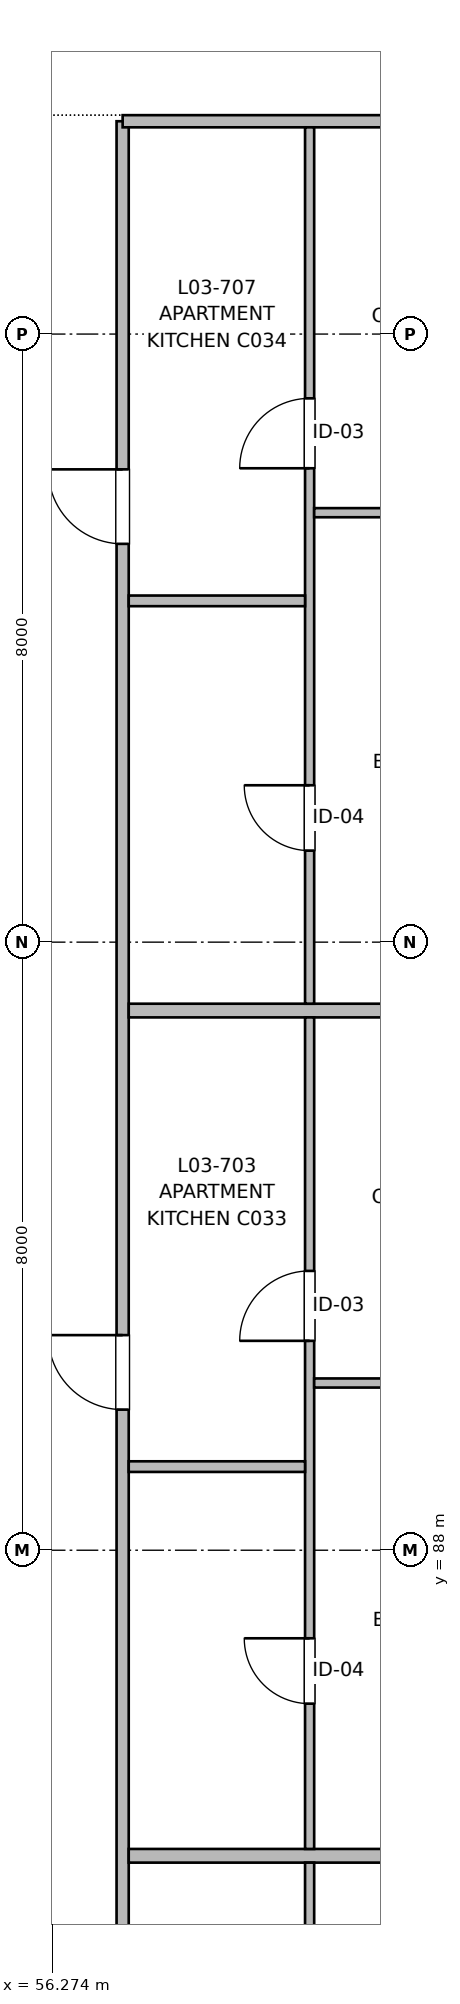
"""IFC4 building model, lengths in metres.
Left out: names, types, materials, properties, quantities, classifications, styles, units other than length and angle.
Written with IfcOpenShell. Run it as: python <this file> out.ifc"""

import sys

from ifc_helpers import new_model, si_unit, direction, frame, frame_2d, origin, place, context, subcontext, project, spatial, rectangle, extrude, element, fill, save


model = new_model("IFC4")
c1 = context("Model", 3, precision=1e-05, world=origin(), true_north=direction((0.0, 1.0)))
c2 = subcontext(c1, "Body", "Model", "MODEL_VIEW")
j1 = project(units=[si_unit("LENGTHUNIT", "METRE"), si_unit("PLANEANGLEUNIT", "RADIAN")], contexts=[c1])
p1 = place(None, origin())
s1 = spatial("IfcSite", under=j1, at=p1, CompositionType="ELEMENT")
p2 = place(p1, origin())
s2 = spatial("IfcBuilding", under=s1, at=p2, CompositionType="ELEMENT")
p3 = place(p2, frame((0.0, 0.0, 10.56)))
s3 = spatial("IfcBuildingStorey", under=s2, at=p3, CompositionType="ELEMENT", Elevation=10.56)
p4 = place(p3, frame((57.2, 56.18, 0.0), z_axis=(0.0, 0.0, 1.0), x_axis=(0.0, 1.0, 0.0)))
e1 = element("IfcWall", 1, at=p4, inside=s3, PredefinedType="PARTITIONING", context=c2, shape_type="SweptSolid", body=[
    extrude(rectangle(XDim=50.62, YDim=0.16, at=frame_2d((25.31, 0.0))), origin(), (0.0, 0.0, 1.0), 2.935),
])
p5 = place(p4, frame((6.99, 0.0, 0.0)))
e2 = element("IfcOpeningElement", 2, at=p5, cuts=e1, PredefinedType="OPENING", context=c2, shape_type="SweptSolid", body=[
    extrude(rectangle(XDim=0.98, YDim=2.15, at=frame_2d((0.49, 1.075))), frame((0.0, 0.09, 0.0), z_axis=(0.0, -1.0, 0.0), x_axis=(1.0, 0.0, 0.0)), (0.0, 0.0, 1.0), 0.18),
])
p6 = place(p4, frame((20.92, 0.0, 0.0)))
e3 = element("IfcOpeningElement", 3, at=p6, cuts=e1, PredefinedType="OPENING", context=c2, shape_type="SweptSolid", body=[
    extrude(rectangle(XDim=1.02, YDim=2.15, at=frame_2d((0.51, 1.075))), frame((0.0, 0.09, 0.0), z_axis=(0.0, -1.0, 0.0), x_axis=(1.0, 0.0, 0.0)), (0.0, 0.0, 1.0), 0.18),
])
p7 = place(p4, frame((33.67, 0.0, 0.0)))
e4 = element("IfcOpeningElement", 4, at=p7, cuts=e1, PredefinedType="OPENING", context=c2, shape_type="SweptSolid", body=[
    extrude(rectangle(XDim=0.98, YDim=2.15, at=frame_2d((0.49, 1.075))), frame((0.0, 0.09, 0.0), z_axis=(0.0, -1.0, 0.0), x_axis=(1.0, 0.0, 0.0)), (0.0, 0.0, 1.0), 0.18),
])
p8 = place(p4, frame((45.06, 0.0, 0.0)))
e5 = element("IfcOpeningElement", 5, at=p8, cuts=e1, PredefinedType="OPENING", context=c2, shape_type="SweptSolid", body=[
    extrude(rectangle(XDim=0.98, YDim=2.15, at=frame_2d((0.49, 1.075))), frame((0.0, 0.09, 0.0), z_axis=(0.0, -1.0, 0.0), x_axis=(1.0, 0.0, 0.0)), (0.0, 0.0, 1.0), 0.18),
])
p9 = place(p3, frame((57.2, 106.8, 0.0), z_axis=(0.0, 0.0, 1.0), x_axis=(1.0, 0.0, 0.0)))
e6 = element("IfcWall", 6, at=p9, inside=s3, PredefinedType="PARTITIONING", context=c2, shape_type="SweptSolid", body=[
    extrude(rectangle(XDim=24.12, YDim=0.16, at=frame_2d((12.06, 0.0))), origin(), (0.0, 0.0, 1.0), 2.935),
])
p10 = place(p9, frame((19.575, 0.0, 0.0)))
e7 = element("IfcOpeningElement", 7, at=p10, cuts=e6, PredefinedType="OPENING", context=c2, shape_type="SweptSolid", body=[
    extrude(rectangle(XDim=1.05, YDim=2.15, at=frame_2d((0.525, 1.075))), frame((0.0, 0.09, 0.0), z_axis=(0.0, -1.0, 0.0), x_axis=(1.0, 0.0, 0.0)), (0.0, 0.0, 1.0), 0.18),
])
p11 = place(p9, frame((8.995, 0.0, 0.0)))
e8 = element("IfcOpeningElement", 8, at=p11, cuts=e6, PredefinedType="OPENING", context=c2, shape_type="SweptSolid", body=[
    extrude(rectangle(XDim=0.98, YDim=2.15, at=frame_2d((0.49, 1.075))), frame((0.0, 0.09, 0.0), z_axis=(0.0, -1.0, 0.0), x_axis=(1.0, 0.0, 0.0)), (0.0, 0.0, 1.0), 0.18),
])
p12 = place(p3, frame((57.28, 83.98, 0.0), z_axis=(0.0, 0.0, 1.0), x_axis=(1.0, 0.0, 0.0)))
e9 = element("IfcWall", 9, at=p12, inside=s3, PredefinedType="PARTITIONING", context=c2, shape_type="SweptSolid", body=[
    extrude(rectangle(XDim=6.59, YDim=0.18, at=frame_2d((3.295, 0.0))), origin(), (0.0, 0.0, 1.0), 2.935),
])
p13 = place(p3, frame((57.28, 95.1, 0.0), z_axis=(0.0, 0.0, 1.0), x_axis=(1.0, 0.0, 0.0)))
e10 = element("IfcWall", 10, at=p13, inside=s3, PredefinedType="PARTITIONING", context=c2, shape_type="SweptSolid", body=[
    extrude(rectangle(XDim=12.887, YDim=0.18, at=frame_2d((6.444, 0.0))), origin(), (0.0, 0.0, 1.0), 2.935),
])
p14 = place(p3, frame((59.66, 69.92, 0.0), z_axis=(0.0, 0.0, 1.0), x_axis=(0.0, 1.0, 0.0)))
e11 = element("IfcWall", 11, at=p14, inside=s3, PredefinedType="PARTITIONING", context=c2, shape_type="SweptSolid", body=[
    extrude(rectangle(XDim=13.97, YDim=0.12, at=frame_2d((6.985, 0.0))), origin(), (0.0, 0.0, 1.0), 2.935),
])
p15 = place(p14, frame((2.443, 0.0, 0.0)))
e12 = element("IfcOpeningElement", 12, at=p15, cuts=e11, PredefinedType="OPENING", context=c2, shape_type="SweptSolid", body=[
    extrude(rectangle(XDim=0.94, YDim=2.1, at=frame_2d((0.47, 1.05))), frame((0.0, 0.07, 0.0), z_axis=(0.0, -1.0, 0.0), x_axis=(1.0, 0.0, 0.0)), (0.0, 0.0, 1.0), 0.14),
])
p16 = place(p14, frame((8.541, 0.0, 0.0)))
e13 = element("IfcOpeningElement", 13, at=p16, cuts=e11, PredefinedType="OPENING", context=c2, shape_type="SweptSolid", body=[
    extrude(rectangle(XDim=0.92, YDim=2.1, at=frame_2d((0.46, 1.05))), frame((0.0, 0.07, 0.0), z_axis=(0.0, -1.0, 0.0), x_axis=(1.0, 0.0, 0.0)), (0.0, 0.0, 1.0), 0.14),
])
p17 = place(p3, frame((59.66, 84.07, 0.0), z_axis=(0.0, 0.0, 1.0), x_axis=(0.0, 1.0, 0.0)))
e14 = element("IfcWall", 14, at=p17, inside=s3, PredefinedType="PARTITIONING", context=c2, shape_type="SweptSolid", body=[
    extrude(rectangle(XDim=10.94, YDim=0.12, at=frame_2d((5.47, 0.0))), origin(), (0.0, 0.0, 1.0), 2.935),
])
p18 = place(p17, frame((1.911, 0.0, 0.0)))
e15 = element("IfcOpeningElement", 15, at=p18, cuts=e14, PredefinedType="OPENING", context=c2, shape_type="SweptSolid", body=[
    extrude(rectangle(XDim=0.86, YDim=2.1, at=frame_2d((0.43, 1.05))), frame((0.0, 0.07, 0.0), z_axis=(0.0, -1.0, 0.0), x_axis=(1.0, 0.0, 0.0)), (0.0, 0.0, 1.0), 0.14),
])
p19 = place(p17, frame((6.685, 0.0, 0.0)))
e16 = element("IfcOpeningElement", 16, at=p19, cuts=e14, PredefinedType="OPENING", context=c2, shape_type="SweptSolid", body=[
    extrude(rectangle(XDim=0.92, YDim=2.1, at=frame_2d((0.46, 1.05))), frame((0.0, 0.07, 0.0), z_axis=(0.0, -1.0, 0.0), x_axis=(1.0, 0.0, 0.0)), (0.0, 0.0, 1.0), 0.14),
])
p20 = place(p3, frame((57.28, 89.1, 0.0), z_axis=(0.0, 0.0, 1.0), x_axis=(1.0, 0.0, 0.0)))
e17 = element("IfcWall", 17, at=p20, inside=s3, PredefinedType="PARTITIONING", context=c2, shape_type="SweptSolid", body=[
    extrude(rectangle(XDim=2.32, YDim=0.14, at=frame_2d((1.16, 0.0))), origin(), (0.0, 0.0, 1.0), 2.935),
])
p21 = place(p3, frame((59.72, 90.2, 0.0), z_axis=(0.0, 0.0, 1.0), x_axis=(1.0, 0.0, 0.0)))
e18 = element("IfcWall", 18, at=p21, inside=s3, PredefinedType="PARTITIONING", context=c2, shape_type="SweptSolid", body=[
    extrude(rectangle(XDim=5.994, YDim=0.12, at=frame_2d((2.997, 0.0))), origin(), (0.0, 0.0, 1.0), 2.935),
])
p22 = place(p21, frame((1.625, 0.0, 0.0)))
e19 = element("IfcOpeningElement", 19, at=p22, cuts=e18, PredefinedType="OPENING", context=c2, shape_type="SweptSolid", body=[
    extrude(rectangle(XDim=0.9, YDim=2.1, at=frame_2d((0.45, 1.05))), frame((0.0, 0.07, 0.0), z_axis=(0.0, -1.0, 0.0), x_axis=(1.0, 0.0, 0.0)), (0.0, 0.0, 1.0), 0.14),
])
p23 = place(p3, frame((59.66, 95.19, 0.0), z_axis=(0.0, 0.0, 1.0), x_axis=(0.0, 1.0, 0.0)))
e20 = element("IfcWall", 20, at=p23, inside=s3, PredefinedType="PARTITIONING", context=c2, shape_type="SweptSolid", body=[
    extrude(rectangle(XDim=11.53, YDim=0.12, at=frame_2d((5.765, 0.0))), origin(), (0.0, 0.0, 1.0), 2.935),
])
p24 = place(p23, frame((2.014, 0.0, 0.0)))
e21 = element("IfcOpeningElement", 21, at=p24, cuts=e20, PredefinedType="OPENING", context=c2, shape_type="SweptSolid", body=[
    extrude(rectangle(XDim=0.86, YDim=2.1, at=frame_2d((0.43, 1.05))), frame((0.0, 0.07, 0.0), z_axis=(0.0, -1.0, 0.0), x_axis=(1.0, 0.0, 0.0)), (0.0, 0.0, 1.0), 0.14),
])
p25 = place(p23, frame((7.044, 0.0, 0.0)))
e22 = element("IfcOpeningElement", 22, at=p25, cuts=e20, PredefinedType="OPENING", context=c2, shape_type="SweptSolid", body=[
    extrude(rectangle(XDim=0.92, YDim=2.1, at=frame_2d((0.46, 1.05))), frame((0.0, 0.07, 0.0), z_axis=(0.0, -1.0, 0.0), x_axis=(1.0, 0.0, 0.0)), (0.0, 0.0, 1.0), 0.14),
])
p26 = place(p3, frame((57.28, 100.49, 0.0), z_axis=(0.0, 0.0, 1.0), x_axis=(1.0, 0.0, 0.0)))
e23 = element("IfcWall", 23, at=p26, inside=s3, PredefinedType="PARTITIONING", context=c2, shape_type="SweptSolid", body=[
    extrude(rectangle(XDim=2.32, YDim=0.14, at=frame_2d((1.16, 0.0))), origin(), (0.0, 0.0, 1.0), 2.73),
])
p27 = place(p3, frame((59.72, 101.65, 0.0), z_axis=(0.0, 0.0, 1.0), x_axis=(1.0, 0.0, 0.0)))
e24 = element("IfcWall", 24, at=p27, inside=s3, PredefinedType="PARTITIONING", context=c2, shape_type="SweptSolid", body=[
    extrude(rectangle(XDim=4.19, YDim=0.12, at=frame_2d((2.095, 0.0))), origin(), (0.0, 0.0, 1.0), 2.935),
])
p28 = place(p27, frame((1.645, 0.0, 0.0)))
e25 = element("IfcOpeningElement", 25, at=p28, cuts=e24, PredefinedType="OPENING", context=c2, shape_type="SweptSolid", body=[
    extrude(rectangle(XDim=0.9, YDim=2.1, at=frame_2d((0.45, 1.05))), frame((0.0, 0.07, 0.0), z_axis=(0.0, -1.0, 0.0), x_axis=(1.0, 0.0, 0.0)), (0.0, 0.0, 1.0), 0.14),
])
p29 = place(p18, origin())
e26 = element("IfcDoor", 26, at=p29, inside=s3, OperationType="SINGLE_SWING_RIGHT", PredefinedType="DOOR", context=c2, shape_type="SweptSolid", body=[
    extrude(rectangle(XDim=0.86, YDim=2.1, at=frame_2d((0.43, 1.05))), frame((0.0, 0.025, 0.0), z_axis=(0.0, -1.0, 0.0), x_axis=(1.0, 0.0, 0.0)), (0.0, 0.0, 1.0), 0.05),
])
fill(e15, e26)
p30 = place(p19, origin())
e27 = element("IfcDoor", 27, at=p30, inside=s3, OperationType="SINGLE_SWING_LEFT", PredefinedType="DOOR", context=c2, shape_type="SweptSolid", body=[
    extrude(rectangle(XDim=0.92, YDim=2.1, at=frame_2d((0.46, 1.05))), frame((0.0, 0.025, 0.0), z_axis=(0.0, -1.0, 0.0), x_axis=(1.0, 0.0, 0.0)), (0.0, 0.0, 1.0), 0.05),
])
fill(e16, e27)
p31 = place(p7, origin())
e28 = element("IfcDoor", 28, at=p31, inside=s3, OperationType="SINGLE_SWING_RIGHT", PredefinedType="DOOR", context=c2, shape_type="SweptSolid", body=[
    extrude(rectangle(XDim=0.98, YDim=2.15, at=frame_2d((0.49, 1.075))), frame((0.0, 0.025, 0.0), z_axis=(0.0, -1.0, 0.0), x_axis=(1.0, 0.0, 0.0)), (0.0, 0.0, 1.0), 0.05),
])
fill(e4, e28)
p32 = place(p24, origin())
e29 = element("IfcDoor", 29, at=p32, inside=s3, OperationType="SINGLE_SWING_RIGHT", PredefinedType="DOOR", context=c2, shape_type="SweptSolid", body=[
    extrude(rectangle(XDim=0.86, YDim=2.1, at=frame_2d((0.43, 1.05))), frame((0.0, 0.025, 0.0), z_axis=(0.0, -1.0, 0.0), x_axis=(1.0, 0.0, 0.0)), (0.0, 0.0, 1.0), 0.05),
])
fill(e21, e29)
p33 = place(p25, origin())
e30 = element("IfcDoor", 30, at=p33, inside=s3, OperationType="SINGLE_SWING_LEFT", PredefinedType="DOOR", context=c2, shape_type="SweptSolid", body=[
    extrude(rectangle(XDim=0.92, YDim=2.1, at=frame_2d((0.46, 1.05))), frame((0.0, 0.025, 0.0), z_axis=(0.0, -1.0, 0.0), x_axis=(1.0, 0.0, 0.0)), (0.0, 0.0, 1.0), 0.05),
])
fill(e22, e30)
p34 = place(p8, origin())
e31 = element("IfcDoor", 31, at=p34, inside=s3, OperationType="SINGLE_SWING_RIGHT", PredefinedType="DOOR", context=c2, shape_type="SweptSolid", body=[
    extrude(rectangle(XDim=0.98, YDim=2.15, at=frame_2d((0.49, 1.075))), frame((0.0, 0.025, 0.0), z_axis=(0.0, -1.0, 0.0), x_axis=(1.0, 0.0, 0.0)), (0.0, 0.0, 1.0), 0.05),
])
fill(e5, e31)
save(model, sys.argv[1])
